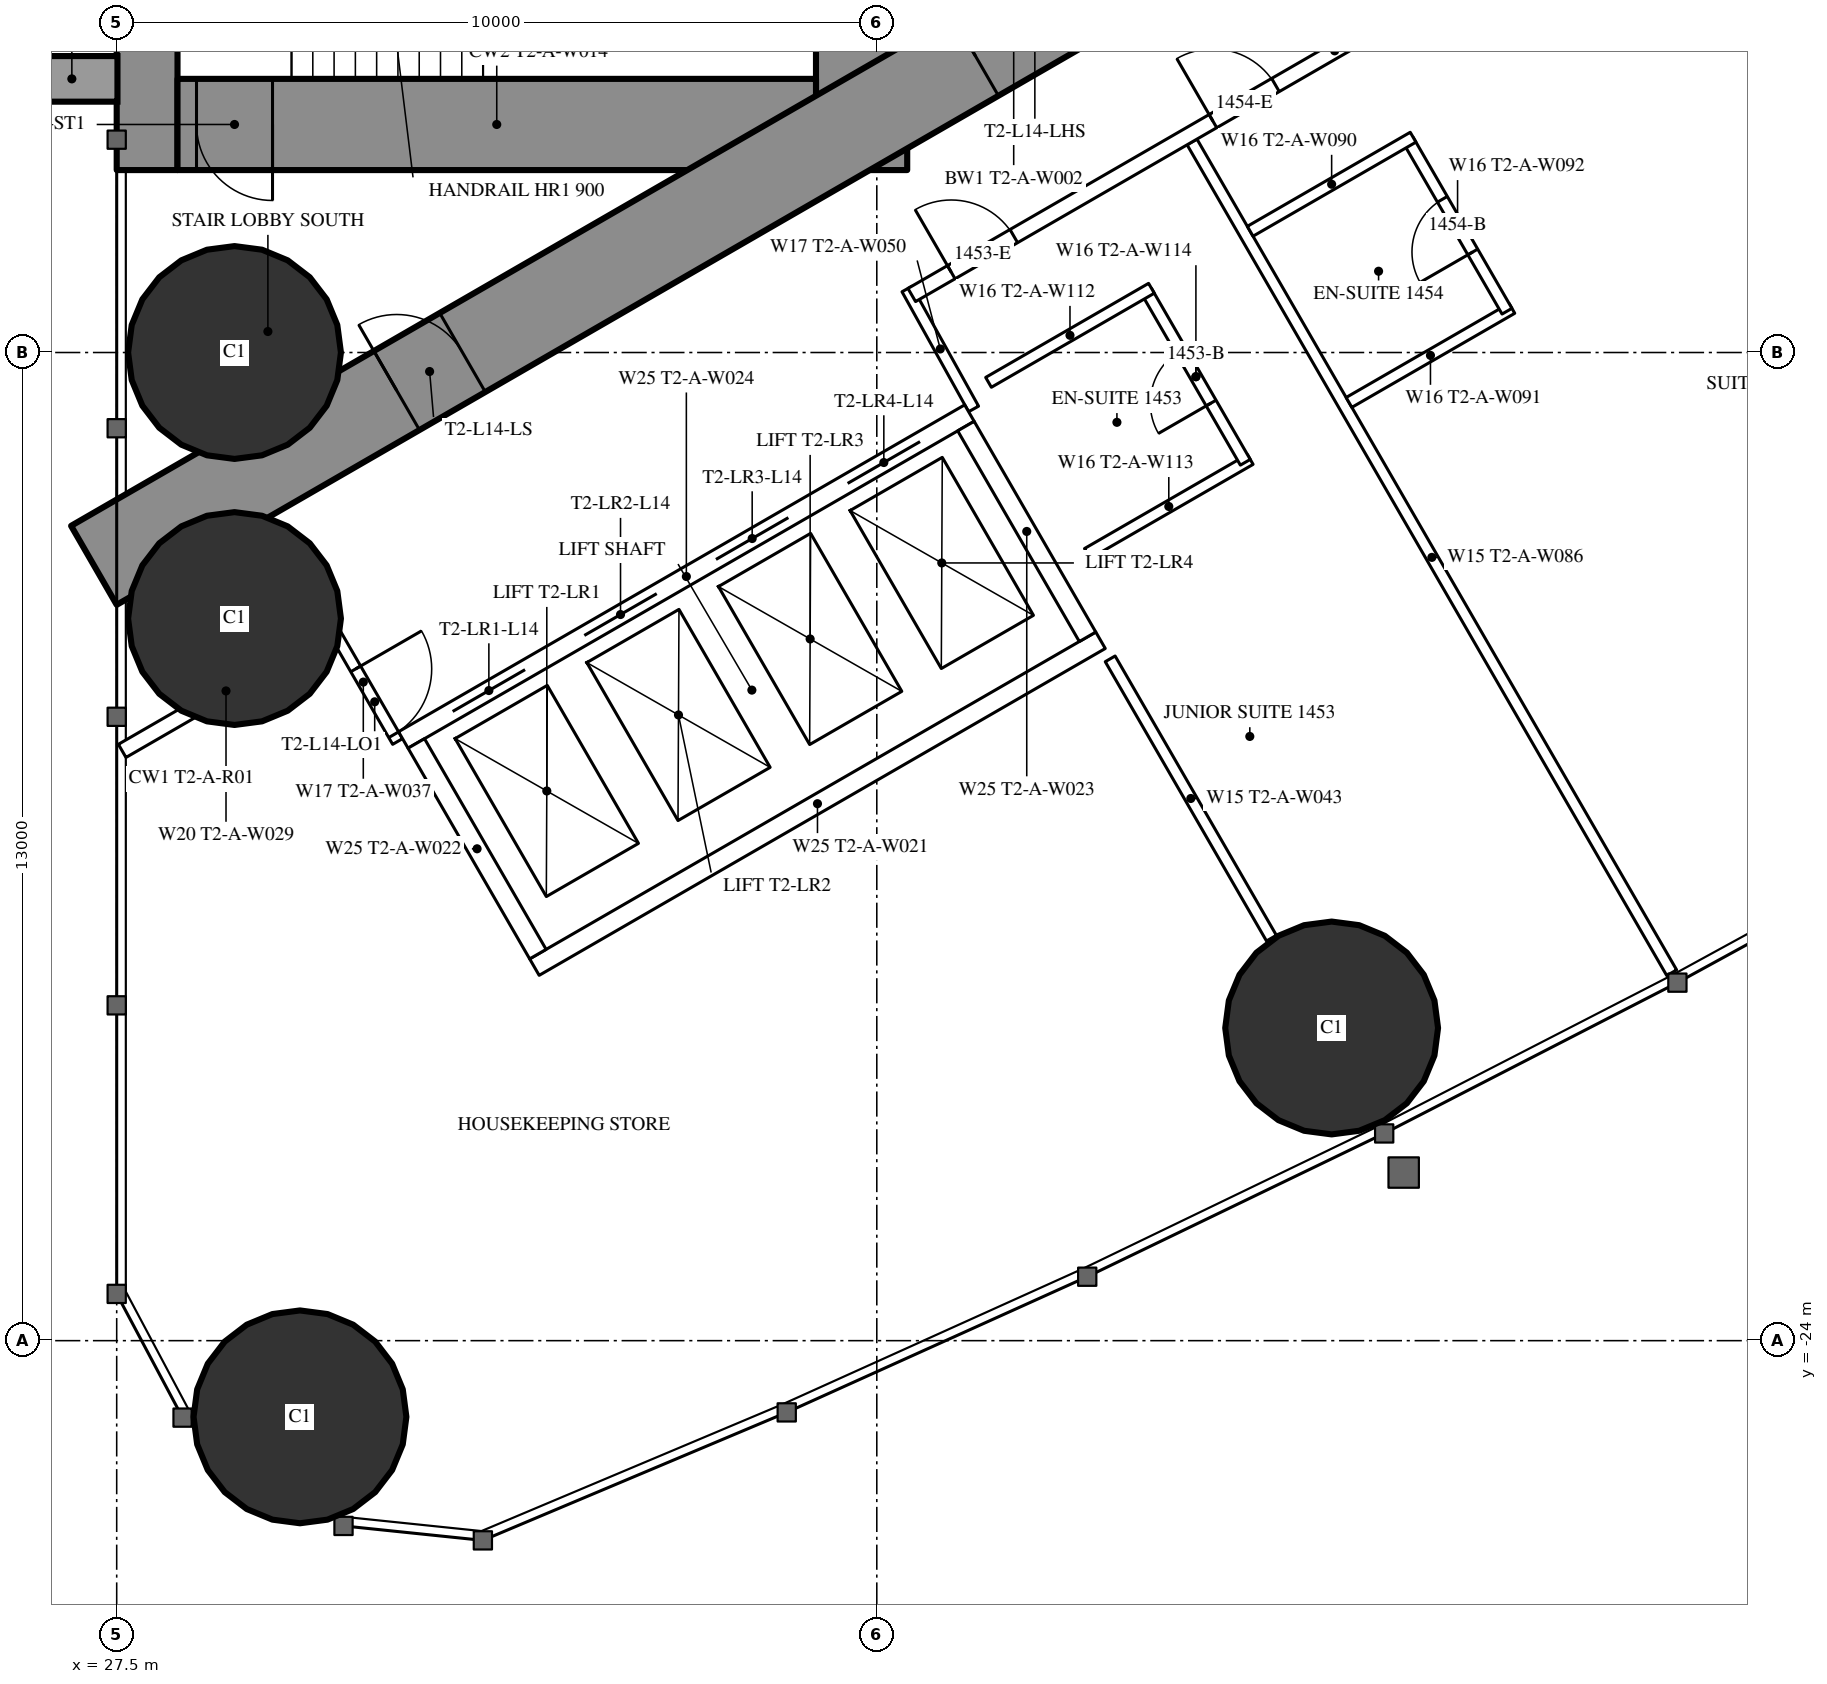
"""IFC4 building model, lengths in metres.
Left out: names, types, materials, properties, quantities, classifications, styles, units other than length and angle.
Written with IfcOpenShell. Run it as: python <this file> out.ifc"""

import sys

from ifc_helpers import new_model, si_unit, direction, frame, frame_2d, origin, origin_2d, place, context, subcontext, project, spatial, rectangle, hollow_circle, extrude, element, fill, save


model = new_model("IFC4")
c1 = context("Model", 3, precision=1e-05, world=origin(), true_north=direction((0.0, 1.0)))
c2 = subcontext(c1, "Body", "Model", "MODEL_VIEW")
j1 = project(units=[si_unit("LENGTHUNIT", "METRE"), si_unit("PLANEANGLEUNIT", "RADIAN")], contexts=[c1])
p1 = place(None, origin())
s1 = spatial("IfcSite", under=j1, at=p1, CompositionType="ELEMENT")
p2 = place(p1, origin())
s2 = spatial("IfcBuilding", under=s1, at=p2, CompositionType="ELEMENT")
p3 = place(p2, frame((0.0, 0.0, 56.5)))
s3 = spatial("IfcBuildingStorey", under=s2, at=p3, CompositionType="ELEMENT", Elevation=56.5)
for number, where, z_axis, x_axis in (
    (1, (29.911, -25.002, 0.0), (0.0, 0.0, 1.0), (1.0, 0.0, 0.0)),
    (2, (29.05, -11.0, 0.0), (0.0, 0.0, 1.0), (1.0, 0.0, 0.0)),
    (3, (29.05, -14.5, 0.0), (0.0, 0.0, 1.0), (1.0, 0.0, 0.0)),
    (4, (43.484, -19.886, 0.0), (0.0, 0.0, 1.0), (1.0, 0.0, 0.0)),
):
    element("IfcColumn", number, at=place(p3, frame(where, z_axis=z_axis, x_axis=x_axis)), inside=s3, PredefinedType="COLUMN", context=c2, shape_type="SweptSolid", body=[
        extrude(hollow_circle(Radius=1.4, WallThickness=0.12, at=origin_2d()), origin(), (0.0, 0.0, 1.0), 3.5),
    ])
p4 = place(p3, frame((27.9, -8.6, 0.0), z_axis=(0.0, 0.0, 1.0), x_axis=(0.0, 1.0, 0.0)))
e5 = element("IfcWall", 5, at=p4, inside=s3, PredefinedType="SHEAR", context=c2, shape_type="SweptSolid", body=[
    extrude(rectangle(XDim=17.2, YDim=0.8, at=frame_2d((8.6, 0.0))), origin(), (0.0, 0.0, 1.0), 3.5),
])
p5 = place(p4, frame((2.45, 0.0, 0.6)))
e6 = element("IfcOpeningElement", 6, at=p5, cuts=e5, PredefinedType="OPENING", context=c2, shape_type="SweptSolid", body=[
    extrude(rectangle(XDim=0.6, YDim=2.1, at=frame_2d((0.3, 1.05))), frame((0.0, 0.41, 0.0), z_axis=(0.0, -1.0, 0.0), x_axis=(1.0, 0.0, 0.0)), (0.0, 0.0, 1.0), 0.82),
])
p6 = place(p4, frame((14.15, 0.0, 0.6)))
e7 = element("IfcOpeningElement", 7, at=p6, cuts=e5, PredefinedType="OPENING", context=c2, shape_type="SweptSolid", body=[
    extrude(rectangle(XDim=0.6, YDim=2.1, at=frame_2d((0.3, 1.05))), frame((0.0, 0.41, 0.0), z_axis=(0.0, -1.0, 0.0), x_axis=(1.0, 0.0, 0.0)), (0.0, 0.0, 1.0), 0.82),
])
p7 = place(p3, frame((37.3, -8.6, 0.0), z_axis=(0.0, 0.0, 1.0), x_axis=(0.0, 1.0, 0.0)))
e8 = element("IfcWall", 8, at=p7, inside=s3, PredefinedType="SHEAR", context=c2, shape_type="SweptSolid", body=[
    extrude(rectangle(XDim=17.2, YDim=1.2, at=frame_2d((8.6, 0.0))), origin(), (0.0, 0.0, 1.0), 3.5),
])
p8 = place(p7, frame((7.7, 0.0, 0.0)))
e9 = element("IfcOpeningElement", 9, at=p8, cuts=e8, PredefinedType="OPENING", context=c2, shape_type="SweptSolid", body=[
    extrude(rectangle(XDim=1.8, YDim=2.2, at=frame_2d((0.9, 1.1))), frame((0.0, 0.61, 0.0), z_axis=(0.0, -1.0, 0.0), x_axis=(1.0, 0.0, 0.0)), (0.0, 0.0, 1.0), 1.22),
])
p9 = place(p3, frame((28.3, -8.0, 0.0), z_axis=(0.0, 0.0, 1.0), x_axis=(1.0, 0.0, 0.0)))
e10 = element("IfcWall", 10, at=p9, inside=s3, PredefinedType="SHEAR", context=c2, shape_type="SweptSolid", body=[
    extrude(rectangle(XDim=8.4, YDim=1.2, at=frame_2d((4.2, 0.0))), origin(), (0.0, 0.0, 1.0), 3.5),
])
p10 = place(p9, frame((0.25, 0.0, 0.0)))
e11 = element("IfcOpeningElement", 11, at=p10, cuts=e10, PredefinedType="OPENING", context=c2, shape_type="SweptSolid", body=[
    extrude(rectangle(XDim=1.0, YDim=2.2, at=frame_2d((0.5, 1.1))), frame((0.0, 0.61, 0.0), z_axis=(0.0, -1.0, 0.0), x_axis=(1.0, 0.0, 0.0)), (0.0, 0.0, 1.0), 1.22),
])
p11 = place(p3, frame((27.2, -13.8, 0.0), z_axis=(0.0, 0.0, 1.0), x_axis=(0.866027159892, 0.499996958321, 0.0)))
e12 = element("IfcWall", 12, at=p11, inside=s3, PredefinedType="SHEAR", context=c2, shape_type="SweptSolid", body=[
    extrude(rectangle(XDim=27.947, YDim=1.2, at=frame_2d((13.973, 0.0))), origin(), (0.0, 0.0, 1.0), 3.5),
])
p12 = place(p11, frame((4.6, 0.0, 0.0)))
e13 = element("IfcOpeningElement", 13, at=p12, cuts=e12, PredefinedType="OPENING", context=c2, shape_type="SweptSolid", body=[
    extrude(rectangle(XDim=1.0, YDim=2.2, at=frame_2d((0.5, 1.1))), frame((0.0, 0.61, 0.0), z_axis=(0.0, -1.0, 0.0), x_axis=(1.0, 0.0, 0.0)), (0.0, 0.0, 1.0), 1.22),
])
p13 = place(p11, frame((13.395, 0.0, 0.0)))
e14 = element("IfcOpeningElement", 14, at=p13, cuts=e12, PredefinedType="OPENING", context=c2, shape_type="SweptSolid", body=[
    extrude(rectangle(XDim=1.8, YDim=2.2, at=frame_2d((0.9, 1.1))), frame((0.0, 0.61, 0.0), z_axis=(0.0, -1.0, 0.0), x_axis=(1.0, 0.0, 0.0)), (0.0, 0.0, 1.0), 1.22),
])
p14 = place(p3, frame((41.647, -8.23, 0.0), z_axis=(0.0, 0.0, 1.0), x_axis=(0.49998590462, -0.866033541603, 0.0)))
e15 = element("IfcWall", 15, at=p14, inside=s3, PredefinedType="PARTITIONING", context=c2, shape_type="SweptSolid", body=[
    extrude(rectangle(XDim=12.621, YDim=0.15, at=frame_2d((6.311, 0.0))), origin(), (0.0, 0.0, 1.0), 3.25),
])
p15 = place(p3, frame((40.57, -15.03, 0.0), z_axis=(0.0, 0.0, 1.0), x_axis=(0.500012993597, -0.866017901798, 0.0)))
e16 = element("IfcWall", 16, at=p15, inside=s3, PredefinedType="PARTITIONING", context=c2, shape_type="SweptSolid", body=[
    extrude(rectangle(XDim=4.243, YDim=0.15, at=frame_2d((2.122, 0.0))), origin(), (0.0, 0.0, 1.0), 3.25),
])
p16 = place(p3, frame((27.572, -16.241, 0.0), z_axis=(0.0, 0.0, 1.0), x_axis=(0.866029654818, 0.499992636921, 0.0)))
e17 = element("IfcWall", 17, at=p16, inside=s3, PredefinedType="PARTITIONING", context=c2, shape_type="SweptSolid", body=[
    extrude(rectangle(XDim=3.155, YDim=0.2, at=frame_2d((1.577, 0.0))), origin(), (0.0, 0.0, 1.0), 3.25),
])
p17 = place(p3, frame((38.773, -11.742, 0.0), z_axis=(0.0, 0.0, 1.0), x_axis=(-0.485528096672, 0.8742210632, 0.0)))
e18 = element("IfcWall", 18, at=p17, inside=s3, PredefinedType="PARTITIONING", context=c2, shape_type="SweptSolid", body=[
    extrude(rectangle(XDim=1.805, YDim=0.15, at=frame_2d((0.903, 0.0))), origin(), (0.0, 0.0, 1.0), 3.25),
])
p18 = place(p3, frame((30.293, -14.554, 0.0), z_axis=(0.0, 0.0, 1.0), x_axis=(0.499980071345, -0.866036909293, 0.0)))
e19 = element("IfcWall", 19, at=p18, inside=s3, PredefinedType="PARTITIONING", context=c2, shape_type="SweptSolid", body=[
    extrude(rectangle(XDim=1.805, YDim=0.15, at=frame_2d((0.902, 0.0))), origin(), (0.0, 0.0, 1.0), 3.25),
])
p19 = place(p18, frame((0.702, 0.0, 0.0)))
e20 = element("IfcOpeningElement", 20, at=p19, cuts=e19, PredefinedType="OPENING", context=c2, shape_type="SweptSolid", body=[
    extrude(rectangle(XDim=1.0, YDim=2.2, at=frame_2d((0.5, 1.1))), frame((0.0, 0.085, 0.0), z_axis=(0.0, -1.0, 0.0), x_axis=(1.0, 0.0, 0.0)), (0.0, 0.0, 1.0), 0.17),
])
p20 = place(p3, frame((37.96, -10.243, 0.0), z_axis=(0.0, 0.0, 1.0), x_axis=(0.866030548046, 0.499991089772, 0.0)))
e21 = element("IfcWall", 21, at=p20, inside=s3, PredefinedType="PARTITIONING", context=c2, shape_type="SweptSolid", body=[
    extrude(rectangle(XDim=12.849, YDim=0.2, at=frame_2d((6.425, 0.0))), origin(), (0.0, 0.0, 1.0), 3.25),
])
p21 = place(p20, frame((4.575, 0.0, 0.0)))
e22 = element("IfcOpeningElement", 22, at=p21, cuts=e21, PredefinedType="OPENING", context=c2, shape_type="SweptSolid", body=[
    extrude(rectangle(XDim=0.95, YDim=2.2, at=frame_2d((0.475, 1.1))), frame((0.0, 0.11, 0.0), z_axis=(0.0, -1.0, 0.0), x_axis=(1.0, 0.0, 0.0)), (0.0, 0.0, 1.0), 0.22),
])
p22 = place(p20, frame((0.6, 0.0, 0.0)))
e23 = element("IfcOpeningElement", 23, at=p22, cuts=e21, PredefinedType="OPENING", context=c2, shape_type="SweptSolid", body=[
    extrude(rectangle(XDim=0.95, YDim=2.2, at=frame_2d((0.475, 1.1))), frame((0.0, 0.11, 0.0), z_axis=(0.0, -1.0, 0.0), x_axis=(1.0, 0.0, 0.0)), (0.0, 0.0, 1.0), 0.22),
])
p23 = place(p3, frame((43.712, -11.657, 0.0), z_axis=(0.0, 0.0, 1.0), x_axis=(0.866006523861, 0.500032699561, 0.0)))
e24 = element("IfcWall", 24, at=p23, inside=s3, PredefinedType="PARTITIONING", context=c2, shape_type="SweptSolid", body=[
    extrude(rectangle(XDim=2.475, YDim=0.15, at=frame_2d((1.237, 0.0))), origin(), (0.0, 0.0, 1.0), 3.25),
])
p24 = place(p3, frame((44.491, -8.205, 0.0), z_axis=(0.0, 0.0, 1.0), x_axis=(0.500047596559, -0.865997922154, 0.0)))
e25 = element("IfcWall", 25, at=p24, inside=s3, PredefinedType="PARTITIONING", context=c2, shape_type="SweptSolid", body=[
    extrude(rectangle(XDim=2.6, YDim=0.15, at=frame_2d((1.3, 0.0))), origin(), (0.0, 0.0, 1.0), 3.25),
])
p25 = place(p24, frame((0.9, 0.0, 0.0)))
e26 = element("IfcOpeningElement", 26, at=p25, cuts=e25, PredefinedType="OPENING", context=c2, shape_type="SweptSolid", body=[
    extrude(rectangle(XDim=0.8, YDim=2.2, at=frame_2d((0.4, 1.1))), frame((0.0, 0.085, 0.0), z_axis=(0.0, -1.0, 0.0), x_axis=(1.0, 0.0, 0.0)), (0.0, 0.0, 1.0), 0.17),
])
p26 = place(p3, frame((42.412, -9.405, 0.0), z_axis=(0.0, 0.0, 1.0), x_axis=(0.866006523861, 0.500032699561, 0.0)))
e27 = element("IfcWall", 27, at=p26, inside=s3, PredefinedType="PARTITIONING", context=c2, shape_type="SweptSolid", body=[
    extrude(rectangle(XDim=2.475, YDim=0.15, at=frame_2d((1.237, 0.0))), origin(), (0.0, 0.0, 1.0), 3.25),
])
p27 = place(p3, frame((40.27, -13.644, 0.0), z_axis=(0.0, 0.0, 1.0), x_axis=(0.866031185235, 0.4999899861, 0.0)))
e28 = element("IfcWall", 28, at=p27, inside=s3, PredefinedType="PARTITIONING", context=c2, shape_type="SweptSolid", body=[
    extrude(rectangle(XDim=2.475, YDim=0.15, at=frame_2d((1.238, 0.0))), origin(), (0.0, 0.0, 1.0), 3.25),
])
p28 = place(p3, frame((41.048, -10.193, 0.0), z_axis=(0.0, 0.0, 1.0), x_axis=(0.500047596559, -0.865997922154, 0.0)))
e29 = element("IfcWall", 29, at=p28, inside=s3, PredefinedType="PARTITIONING", context=c2, shape_type="SweptSolid", body=[
    extrude(rectangle(XDim=2.6, YDim=0.15, at=frame_2d((1.3, 0.0))), origin(), (0.0, 0.0, 1.0), 3.25),
])
p29 = place(p28, frame((0.9, 0.0, 0.0)))
e30 = element("IfcOpeningElement", 30, at=p29, cuts=e29, PredefinedType="OPENING", context=c2, shape_type="SweptSolid", body=[
    extrude(rectangle(XDim=0.8, YDim=2.2, at=frame_2d((0.4, 1.1))), frame((0.0, 0.085, 0.0), z_axis=(0.0, -1.0, 0.0), x_axis=(1.0, 0.0, 0.0)), (0.0, 0.0, 1.0), 0.17),
])
p30 = place(p3, frame((38.97, -11.393, 0.0), z_axis=(0.0, 0.0, 1.0), x_axis=(0.866031185235, 0.4999899861, 0.0)))
e31 = element("IfcWall", 31, at=p30, inside=s3, PredefinedType="PARTITIONING", context=c2, shape_type="SweptSolid", body=[
    extrude(rectangle(XDim=2.475, YDim=0.15, at=frame_2d((1.238, 0.0))), origin(), (0.0, 0.0, 1.0), 3.25),
])
p31 = place(p3, frame((31.271, -16.097, 0.0), z_axis=(0.0, 0.0, 1.0), x_axis=(0.86604045752, 0.499973925258, 0.0)))
e32 = element("IfcWall", 32, at=p31, inside=s3, PredefinedType="PARTITIONING", context=c2, shape_type="SweptSolid", body=[
    extrude(rectangle(XDim=8.6, YDim=0.25, at=frame_2d((4.3, 0.0))), origin(), (0.0, 0.0, 1.0), 3.25),
])
p32 = place(p31, frame((0.75, 0.0, 0.0)))
e33 = element("IfcOpeningElement", 33, at=p32, cuts=e32, PredefinedType="OPENING", context=c2, shape_type="SweptSolid", body=[
    extrude(rectangle(XDim=1.1, YDim=2.2, at=frame_2d((0.55, 1.1))), frame((0.0, 0.135, 0.0), z_axis=(0.0, -1.0, 0.0), x_axis=(1.0, 0.0, 0.0)), (0.0, 0.0, 1.0), 0.27),
])
p33 = place(p31, frame((2.75, 0.0, 0.0)))
e34 = element("IfcOpeningElement", 34, at=p33, cuts=e32, PredefinedType="OPENING", context=c2, shape_type="SweptSolid", body=[
    extrude(rectangle(XDim=1.1, YDim=2.2, at=frame_2d((0.55, 1.1))), frame((0.0, 0.135, 0.0), z_axis=(0.0, -1.0, 0.0), x_axis=(1.0, 0.0, 0.0)), (0.0, 0.0, 1.0), 0.27),
])
p34 = place(p31, frame((4.75, 0.0, 0.0)))
e35 = element("IfcOpeningElement", 35, at=p34, cuts=e32, PredefinedType="OPENING", context=c2, shape_type="SweptSolid", body=[
    extrude(rectangle(XDim=1.1, YDim=2.2, at=frame_2d((0.55, 1.1))), frame((0.0, 0.135, 0.0), z_axis=(0.0, -1.0, 0.0), x_axis=(1.0, 0.0, 0.0)), (0.0, 0.0, 1.0), 0.27),
])
p35 = place(p31, frame((6.75, 0.0, 0.0)))
e36 = element("IfcOpeningElement", 36, at=p35, cuts=e32, PredefinedType="OPENING", context=c2, shape_type="SweptSolid", body=[
    extrude(rectangle(XDim=1.1, YDim=2.2, at=frame_2d((0.55, 1.1))), frame((0.0, 0.135, 0.0), z_axis=(0.0, -1.0, 0.0), x_axis=(1.0, 0.0, 0.0)), (0.0, 0.0, 1.0), 0.27),
])
p36 = place(p3, frame((32.996, -19.086, 0.0), z_axis=(0.0, 0.0, 1.0), x_axis=(0.866028165386, 0.499995216735, 0.0)))
e37 = element("IfcWall", 37, at=p36, inside=s3, PredefinedType="PARTITIONING", context=c2, shape_type="SweptSolid", body=[
    extrude(rectangle(XDim=8.6, YDim=0.25, at=frame_2d((4.3, 0.0))), origin(), (0.0, 0.0, 1.0), 3.25),
])
for number, where, z_axis, x_axis in (
    (38, (31.441, -16.143, 0.0), (0.0, 0.0, 1.0), (0.5, -0.866, 0.0)),
    (39, (38.673, -11.968, 0.0), (0.0, 0.0, 1.0), (0.5, -0.866, 0.0)),
):
    element("IfcWall", number, at=place(p3, frame(where, z_axis=z_axis, x_axis=x_axis)), inside=s3, PredefinedType="PARTITIONING", context=c2, shape_type="SweptSolid", body=[
        extrude(rectangle(XDim=3.201, YDim=0.25, at=frame_2d((1.6, 0.0))), origin(), (0.0, 0.0, 1.0), 3.25),
    ])
p37 = place(p25, origin())
e40 = element("IfcDoor", 40, at=p37, inside=s3, OperationType="SINGLE_SWING_RIGHT", PredefinedType="DOOR", context=c2, shape_type="SweptSolid", body=[
    extrude(rectangle(XDim=0.8, YDim=2.2, at=frame_2d((0.4, 1.1))), frame((0.0, 0.025, 0.0), z_axis=(0.0, -1.0, 0.0), x_axis=(1.0, 0.0, 0.0)), (0.0, 0.0, 1.0), 0.05),
])
fill(e26, e40)
p38 = place(p21, origin())
e41 = element("IfcDoor", 41, at=p38, inside=s3, OperationType="SINGLE_SWING_LEFT", PredefinedType="DOOR", context=c2, shape_type="SweptSolid", body=[
    extrude(rectangle(XDim=0.95, YDim=2.2, at=frame_2d((0.475, 1.1))), frame((0.0, 0.025, 0.0), z_axis=(0.0, -1.0, 0.0), x_axis=(1.0, 0.0, 0.0)), (0.0, 0.0, 1.0), 0.05),
])
fill(e22, e41)
p39 = place(p29, origin())
e42 = element("IfcDoor", 42, at=p39, inside=s3, OperationType="SINGLE_SWING_RIGHT", PredefinedType="DOOR", context=c2, shape_type="SweptSolid", body=[
    extrude(rectangle(XDim=0.8, YDim=2.2, at=frame_2d((0.4, 1.1))), frame((0.0, 0.025, 0.0), z_axis=(0.0, -1.0, 0.0), x_axis=(1.0, 0.0, 0.0)), (0.0, 0.0, 1.0), 0.05),
])
fill(e30, e42)
p40 = place(p22, origin())
e43 = element("IfcDoor", 43, at=p40, inside=s3, OperationType="SINGLE_SWING_LEFT", PredefinedType="DOOR", context=c2, shape_type="SweptSolid", body=[
    extrude(rectangle(XDim=0.95, YDim=2.2, at=frame_2d((0.475, 1.1))), frame((0.0, 0.025, 0.0), z_axis=(0.0, -1.0, 0.0), x_axis=(1.0, 0.0, 0.0)), (0.0, 0.0, 1.0), 0.05),
])
fill(e23, e43)
p41 = place(p19, origin())
e44 = element("IfcDoor", 44, at=p41, inside=s3, OperationType="SINGLE_SWING_LEFT", PredefinedType="DOOR", context=c2, shape_type="SweptSolid", body=[
    extrude(rectangle(XDim=1.0, YDim=2.2, at=frame_2d((0.5, 1.1))), frame((0.0, 0.025, 0.0), z_axis=(0.0, -1.0, 0.0), x_axis=(1.0, 0.0, 0.0)), (0.0, 0.0, 1.0), 0.05),
])
fill(e20, e44)
p42 = place(p12, origin())
e45 = element("IfcDoor", 45, at=p42, inside=s3, OperationType="SINGLE_SWING_LEFT", PredefinedType="DOOR", context=c2, shape_type="SweptSolid", body=[
    extrude(rectangle(XDim=1.0, YDim=2.2, at=frame_2d((0.5, 1.1))), frame((0.0, 0.025, 0.0), z_axis=(0.0, -1.0, 0.0), x_axis=(1.0, 0.0, 0.0)), (0.0, 0.0, 1.0), 0.05),
])
fill(e13, e45)
p43 = place(p13, origin())
e46 = element("IfcDoor", 46, at=p43, inside=s3, OperationType="DOUBLE_DOOR_SINGLE_SWING", PredefinedType="DOOR", context=c2, shape_type="SweptSolid", body=[
    extrude(rectangle(XDim=1.8, YDim=2.2, at=frame_2d((0.9, 1.1))), frame((0.0, 0.025, 0.0), z_axis=(0.0, -1.0, 0.0), x_axis=(1.0, 0.0, 0.0)), (0.0, 0.0, 1.0), 0.05),
])
fill(e14, e46)
p44 = place(p10, origin())
e47 = element("IfcDoor", 47, at=p44, inside=s3, OperationType="SINGLE_SWING_RIGHT", PredefinedType="DOOR", context=c2, shape_type="SweptSolid", body=[
    extrude(rectangle(XDim=1.0, YDim=2.2, at=frame_2d((0.5, 1.1))), frame((0.0, 0.025, 0.0), z_axis=(0.0, -1.0, 0.0), x_axis=(1.0, 0.0, 0.0)), (0.0, 0.0, 1.0), 0.05),
])
fill(e11, e47)
p45 = place(p32, origin())
e48 = element("IfcDoor", 48, at=p45, inside=s3, OperationType="DOUBLE_DOOR_SLIDING", PredefinedType="USERDEFINED", context=c2, shape_type="SweptSolid", body=[
    extrude(rectangle(XDim=1.1, YDim=2.2, at=frame_2d((0.55, 1.1))), frame((0.0, 0.025, 0.0), z_axis=(0.0, -1.0, 0.0), x_axis=(1.0, 0.0, 0.0)), (0.0, 0.0, 1.0), 0.05),
])
fill(e33, e48)
p46 = place(p33, origin())
e49 = element("IfcDoor", 49, at=p46, inside=s3, OperationType="DOUBLE_DOOR_SLIDING", PredefinedType="USERDEFINED", context=c2, shape_type="SweptSolid", body=[
    extrude(rectangle(XDim=1.1, YDim=2.2, at=frame_2d((0.55, 1.1))), frame((0.0, 0.025, 0.0), z_axis=(0.0, -1.0, 0.0), x_axis=(1.0, 0.0, 0.0)), (0.0, 0.0, 1.0), 0.05),
])
fill(e34, e49)
p47 = place(p34, origin())
e50 = element("IfcDoor", 50, at=p47, inside=s3, OperationType="DOUBLE_DOOR_SLIDING", PredefinedType="USERDEFINED", context=c2, shape_type="SweptSolid", body=[
    extrude(rectangle(XDim=1.1, YDim=2.2, at=frame_2d((0.55, 1.1))), frame((0.0, 0.025, 0.0), z_axis=(0.0, -1.0, 0.0), x_axis=(1.0, 0.0, 0.0)), (0.0, 0.0, 1.0), 0.05),
])
fill(e35, e50)
p48 = place(p35, origin())
e51 = element("IfcDoor", 51, at=p48, inside=s3, OperationType="DOUBLE_DOOR_SLIDING", PredefinedType="USERDEFINED", context=c2, shape_type="SweptSolid", body=[
    extrude(rectangle(XDim=1.1, YDim=2.2, at=frame_2d((0.55, 1.1))), frame((0.0, 0.025, 0.0), z_axis=(0.0, -1.0, 0.0), x_axis=(1.0, 0.0, 0.0)), (0.0, 0.0, 1.0), 0.05),
])
fill(e36, e51)
save(model, sys.argv[1])
